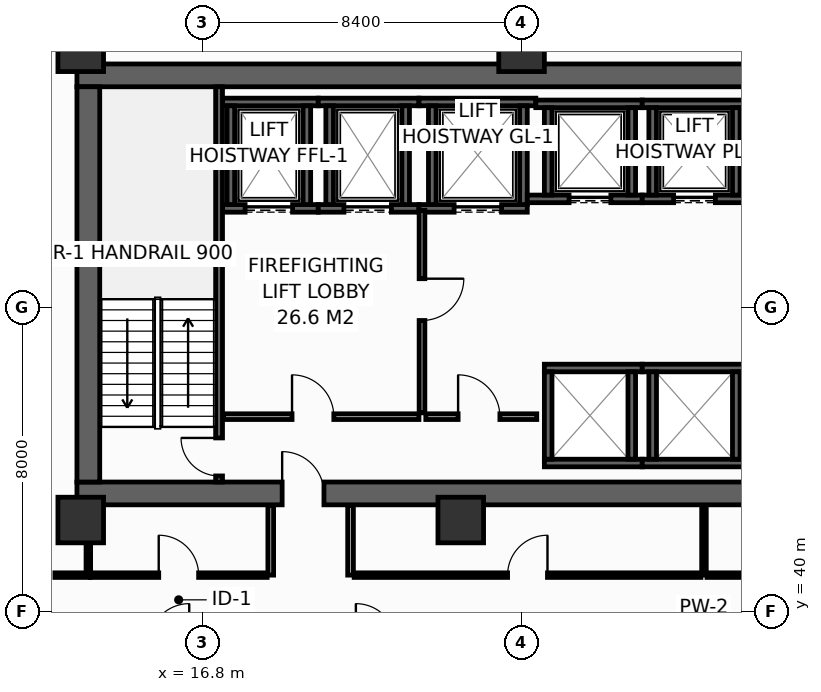
"""IFC4 building model, lengths in metres.
Left out: names, types, materials, properties, quantities, classifications, styles, units other than length and angle.
Written with IfcOpenShell. Run it as: python <this file> out.ifc"""

import sys

from ifc_helpers import new_model, si_unit, direction, frame, frame_2d, origin, origin_2d, place, context, subcontext, project, spatial, rectangle, hollow_rectangle, extrude, element, fill, save


model = new_model("IFC4")
c1 = context("Model", 3, precision=1e-05, world=origin(), true_north=direction((0.0, 1.0)))
c2 = subcontext(c1, "Body", "Model", "MODEL_VIEW")
j1 = project(units=[si_unit("LENGTHUNIT", "METRE"), si_unit("PLANEANGLEUNIT", "RADIAN")], contexts=[c1])
p1 = place(None, origin())
s1 = spatial("IfcSite", under=j1, at=p1, CompositionType="ELEMENT")
p2 = place(p1, origin())
s2 = spatial("IfcBuilding", under=s1, at=p2, CompositionType="ELEMENT")
p3 = place(p2, frame((0.0, 0.0, 47.2)))
s3 = spatial("IfcBuildingStorey", under=s2, at=p3, CompositionType="ELEMENT", Elevation=47.2)
p4 = place(p3, frame((13.5, 43.1, 0.0), z_axis=(0.0, 0.0, 1.0), x_axis=(1.0, 0.0, 0.0)))
e1 = element("IfcWall", 1, at=p4, inside=s3, PredefinedType="SHEAR", context=c2, shape_type="SweptSolid", body=[
    extrude(rectangle(XDim=32.9, YDim=0.6, at=frame_2d((16.45, 0.0))), origin(), (0.0, 0.0, 1.0), 4.15),
])
p5 = place(p4, frame((5.4, 0.0, 0.0)))
e2 = element("IfcOpeningElement", 2, at=p5, cuts=e1, PredefinedType="OPENING", context=c2, shape_type="SweptSolid", body=[
    extrude(rectangle(XDim=1.1, YDim=2.15, at=frame_2d((0.55, 1.075))), frame((0.0, 0.31, 0.0), z_axis=(0.0, -1.0, 0.0), x_axis=(1.0, 0.0, 0.0)), (0.0, 0.0, 1.0), 0.62),
])
p6 = place(p4, frame((25.6, 0.0, 0.0)))
e3 = element("IfcOpeningElement", 3, at=p6, cuts=e1, PredefinedType="OPENING", context=c2, shape_type="SweptSolid", body=[
    extrude(rectangle(XDim=1.1, YDim=2.15, at=frame_2d((0.55, 1.075))), frame((0.0, 0.31, 0.0), z_axis=(0.0, -1.0, 0.0), x_axis=(1.0, 0.0, 0.0)), (0.0, 0.0, 1.0), 0.62),
])
p7 = place(p3, frame((13.5, 54.1, 0.0), z_axis=(0.0, 0.0, 1.0), x_axis=(1.0, 0.0, 0.0)))
e4 = element("IfcWall", 4, at=p7, inside=s3, PredefinedType="SHEAR", context=c2, shape_type="SweptSolid", body=[
    extrude(rectangle(XDim=32.9, YDim=0.6, at=frame_2d((16.45, 0.0))), origin(), (0.0, 0.0, 1.0), 4.15),
])
p8 = place(p3, frame((13.8, 43.4, 0.0), z_axis=(0.0, 0.0, 1.0), x_axis=(0.0, 1.0, 0.0)))
e5 = element("IfcWall", 5, at=p8, inside=s3, PredefinedType="SHEAR", context=c2, shape_type="SweptSolid", body=[
    extrude(rectangle(XDim=10.4, YDim=0.6, at=frame_2d((5.2, 0.0))), origin(), (0.0, 0.0, 1.0), 4.15),
])
for number, where, z_axis, x_axis in (
    (6, (13.6, 54.8, 0.0), (0.0, 0.0, 1.0), (1.0, 0.0, 0.0)),
    (7, (25.2, 54.8, 0.0), (0.0, 0.0, 1.0), (1.0, 0.0, 0.0)),
    (8, (13.6, 42.4, 0.0), (0.0, 0.0, 1.0), (1.0, 0.0, 0.0)),
    (9, (23.6, 42.4, 0.0), (0.0, 0.0, 1.0), (1.0, 0.0, 0.0)),
):
    element("IfcColumn", number, at=place(p3, frame(where, z_axis=z_axis, x_axis=x_axis)), inside=s3, PredefinedType="COLUMN", context=c2, shape_type="SweptSolid", body=[
        extrude(hollow_rectangle(XDim=1.2, YDim=1.2, WallThickness=0.055, at=origin_2d()), origin(), (0.0, 0.0, 1.0), 4.4),
    ])
p9 = place(p3, frame((17.33, 50.6, 0.0), z_axis=(0.0, 0.0, 1.0), x_axis=(1.0, 0.0, 0.0)))
e10 = element("IfcWall", 10, at=p9, inside=s3, PredefinedType="SHEAR", context=c2, shape_type="SweptSolid", body=[
    extrude(rectangle(XDim=2.52, YDim=0.2, at=frame_2d((1.26, 0.0))), origin(), (0.0, 0.0, 1.0), 4.15),
])
p10 = place(p9, frame((0.595, 0.0, 0.0)))
e11 = element("IfcOpeningElement", 11, at=p10, cuts=e10, PredefinedType="OPENING", context=c2, shape_type="SweptSolid", body=[
    extrude(rectangle(XDim=1.25, YDim=2.3, at=frame_2d((0.625, 1.15))), frame((0.0, 0.11, 0.0), z_axis=(0.0, -1.0, 0.0), x_axis=(1.0, 0.0, 0.0)), (0.0, 0.0, 1.0), 0.22),
])
p11 = place(p3, frame((17.33, 53.4, 0.0), z_axis=(0.0, 0.0, 1.0), x_axis=(1.0, 0.0, 0.0)))
e12 = element("IfcWall", 12, at=p11, inside=s3, PredefinedType="SHEAR", context=c2, shape_type="SweptSolid", body=[
    extrude(rectangle(XDim=2.52, YDim=0.2, at=frame_2d((1.26, 0.0))), origin(), (0.0, 0.0, 1.0), 4.15),
])
for number, where, z_axis, x_axis in (
    (13, (17.55, 50.7, 0.0), (0.0, 0.0, 1.0), (0.0, 1.0, 0.0)),
    (14, (19.55, 50.7, 0.0), (0.0, 0.0, 1.0), (0.0, 1.0, 0.0)),
):
    element("IfcWall", number, at=place(p3, frame(where, z_axis=z_axis, x_axis=x_axis)), inside=s3, PredefinedType="SHEAR", context=c2, shape_type="SweptSolid", body=[
        extrude(rectangle(XDim=2.6, YDim=0.2, at=frame_2d((1.3, 0.0))), origin(), (0.0, 0.0, 1.0), 4.15),
    ])
p12 = place(p3, frame((19.85, 50.6, 0.0), z_axis=(0.0, 0.0, 1.0), x_axis=(1.0, 0.0, 0.0)))
e15 = element("IfcWall", 15, at=p12, inside=s3, PredefinedType="SHEAR", context=c2, shape_type="SweptSolid", body=[
    extrude(rectangle(XDim=2.65, YDim=0.2, at=frame_2d((1.325, 0.0))), origin(), (0.0, 0.0, 1.0), 4.15),
])
p13 = place(p12, frame((0.675, 0.0, 0.0)))
e16 = element("IfcOpeningElement", 16, at=p13, cuts=e15, PredefinedType="OPENING", context=c2, shape_type="SweptSolid", body=[
    extrude(rectangle(XDim=1.25, YDim=2.3, at=frame_2d((0.625, 1.15))), frame((0.0, 0.11, 0.0), z_axis=(0.0, -1.0, 0.0), x_axis=(1.0, 0.0, 0.0)), (0.0, 0.0, 1.0), 0.22),
])
p14 = place(p3, frame((19.85, 53.4, 0.0), z_axis=(0.0, 0.0, 1.0), x_axis=(1.0, 0.0, 0.0)))
e17 = element("IfcWall", 17, at=p14, inside=s3, PredefinedType="SHEAR", context=c2, shape_type="SweptSolid", body=[
    extrude(rectangle(XDim=2.65, YDim=0.2, at=frame_2d((1.325, 0.0))), origin(), (0.0, 0.0, 1.0), 4.15),
])
for number, where, z_axis, x_axis in (
    (18, (20.15, 50.7, 0.0), (0.0, 0.0, 1.0), (0.0, 1.0, 0.0)),
    (19, (22.15, 50.7, 0.0), (0.0, 0.0, 1.0), (0.0, 1.0, 0.0)),
):
    element("IfcWall", number, at=place(p3, frame(where, z_axis=z_axis, x_axis=x_axis)), inside=s3, PredefinedType="SHEAR", context=c2, shape_type="SweptSolid", body=[
        extrude(rectangle(XDim=2.6, YDim=0.2, at=frame_2d((1.3, 0.0))), origin(), (0.0, 0.0, 1.0), 4.15),
    ])
p15 = place(p3, frame((22.5, 50.6, 0.0), z_axis=(0.0, 0.0, 1.0), x_axis=(1.0, 0.0, 0.0)))
e20 = element("IfcWall", 20, at=p15, inside=s3, PredefinedType="SHEAR", context=c2, shape_type="SweptSolid", body=[
    extrude(rectangle(XDim=2.85, YDim=0.2, at=frame_2d((1.425, 0.0))), origin(), (0.0, 0.0, 1.0), 4.15),
])
p16 = place(p15, frame((0.925, 0.0, 0.0)))
e21 = element("IfcOpeningElement", 21, at=p16, cuts=e20, PredefinedType="OPENING", context=c2, shape_type="SweptSolid", body=[
    extrude(rectangle(XDim=1.25, YDim=2.3, at=frame_2d((0.625, 1.15))), frame((0.0, 0.11, 0.0), z_axis=(0.0, -1.0, 0.0), x_axis=(1.0, 0.0, 0.0)), (0.0, 0.0, 1.0), 0.22),
])
p17 = place(p3, frame((22.5, 53.4, 0.0), z_axis=(0.0, 0.0, 1.0), x_axis=(1.0, 0.0, 0.0)))
e22 = element("IfcWall", 22, at=p17, inside=s3, PredefinedType="SHEAR", context=c2, shape_type="SweptSolid", body=[
    extrude(rectangle(XDim=3.075, YDim=0.2, at=frame_2d((1.538, 0.0))), origin(), (0.0, 0.0, 1.0), 4.15),
])
for number, where, z_axis, x_axis in (
    (23, (22.85, 50.7, 0.0), (0.0, 0.0, 1.0), (0.0, 1.0, 0.0)),
    (24, (25.25, 50.7, 0.0), (0.0, 0.0, 1.0), (0.0, 1.0, 0.0)),
):
    element("IfcWall", number, at=place(p3, frame(where, z_axis=z_axis, x_axis=x_axis)), inside=s3, PredefinedType="SHEAR", context=c2, shape_type="SweptSolid", body=[
        extrude(rectangle(XDim=2.6, YDim=0.2, at=frame_2d((1.3, 0.0))), origin(), (0.0, 0.0, 1.0), 4.15),
    ])
p18 = place(p3, frame((25.35, 50.85, 0.0), z_axis=(0.0, 0.0, 1.0), x_axis=(1.0, 0.0, 0.0)))
e25 = element("IfcWall", 25, at=p18, inside=s3, PredefinedType="SHEAR", context=c2, shape_type="SweptSolid", body=[
    extrude(rectangle(XDim=3.025, YDim=0.2, at=frame_2d((1.512, 0.0))), origin(), (0.0, 0.0, 1.0), 4.15),
])
p19 = place(p18, frame((1.1, 0.0, 0.0)))
e26 = element("IfcOpeningElement", 26, at=p19, cuts=e25, PredefinedType="OPENING", context=c2, shape_type="SweptSolid", body=[
    extrude(rectangle(XDim=1.1, YDim=2.2, at=frame_2d((0.55, 1.1))), frame((0.0, 0.11, 0.0), z_axis=(0.0, -1.0, 0.0), x_axis=(1.0, 0.0, 0.0)), (0.0, 0.0, 1.0), 0.22),
])
p20 = place(p3, frame((25.575, 53.35, 0.0), z_axis=(0.0, 0.0, 1.0), x_axis=(1.0, 0.0, 0.0)))
e27 = element("IfcWall", 27, at=p20, inside=s3, PredefinedType="SHEAR", context=c2, shape_type="SweptSolid", body=[
    extrude(rectangle(XDim=2.8, YDim=0.2, at=frame_2d((1.4, 0.0))), origin(), (0.0, 0.0, 1.0), 4.15),
])
for number, where, z_axis, x_axis in (
    (28, (25.9, 50.95, 0.0), (0.0, 0.0, 1.0), (0.0, 1.0, 0.0)),
    (29, (28.1, 50.95, 0.0), (0.0, 0.0, 1.0), (0.0, 1.0, 0.0)),
):
    element("IfcWall", number, at=place(p3, frame(where, z_axis=z_axis, x_axis=x_axis)), inside=s3, PredefinedType="SHEAR", context=c2, shape_type="SweptSolid", body=[
        extrude(rectangle(XDim=2.3, YDim=0.2, at=frame_2d((1.15, 0.0))), origin(), (0.0, 0.0, 1.0), 4.15),
    ])
p21 = place(p3, frame((28.375, 50.85, 0.0), z_axis=(0.0, 0.0, 1.0), x_axis=(1.0, 0.0, 0.0)))
e30 = element("IfcWall", 30, at=p21, inside=s3, PredefinedType="SHEAR", context=c2, shape_type="SweptSolid", body=[
    extrude(rectangle(XDim=2.75, YDim=0.2, at=frame_2d((1.375, 0.0))), origin(), (0.0, 0.0, 1.0), 4.15),
])
p22 = place(p21, frame((0.825, 0.0, 0.0)))
e31 = element("IfcOpeningElement", 31, at=p22, cuts=e30, PredefinedType="OPENING", context=c2, shape_type="SweptSolid", body=[
    extrude(rectangle(XDim=1.1, YDim=2.2, at=frame_2d((0.55, 1.1))), frame((0.0, 0.11, 0.0), z_axis=(0.0, -1.0, 0.0), x_axis=(1.0, 0.0, 0.0)), (0.0, 0.0, 1.0), 0.22),
])
p23 = place(p3, frame((28.375, 53.35, 0.0), z_axis=(0.0, 0.0, 1.0), x_axis=(1.0, 0.0, 0.0)))
e32 = element("IfcWall", 32, at=p23, inside=s3, PredefinedType="SHEAR", context=c2, shape_type="SweptSolid", body=[
    extrude(rectangle(XDim=2.75, YDim=0.2, at=frame_2d((1.375, 0.0))), origin(), (0.0, 0.0, 1.0), 4.15),
])
for number, where, z_axis, x_axis in (
    (33, (28.65, 50.95, 0.0), (0.0, 0.0, 1.0), (0.0, 1.0, 0.0)),
    (34, (30.85, 50.95, 0.0), (0.0, 0.0, 1.0), (0.0, 1.0, 0.0)),
):
    element("IfcWall", number, at=place(p3, frame(where, z_axis=z_axis, x_axis=x_axis)), inside=s3, PredefinedType="SHEAR", context=c2, shape_type="SweptSolid", body=[
        extrude(rectangle(XDim=2.3, YDim=0.2, at=frame_2d((1.15, 0.0))), origin(), (0.0, 0.0, 1.0), 4.15),
    ])
for number, where, z_axis, x_axis in (
    (35, (25.8, 43.9, 0.0), (0.0, 0.0, 1.0), (1.0, 0.0, 0.0)),
    (36, (25.8, 46.4, 0.0), (0.0, 0.0, 1.0), (1.0, 0.0, 0.0)),
):
    element("IfcWall", number, at=place(p3, frame(where, z_axis=z_axis, x_axis=x_axis)), inside=s3, PredefinedType="SHEAR", context=c2, shape_type="SweptSolid", body=[
        extrude(rectangle(XDim=2.575, YDim=0.2, at=frame_2d((1.288, 0.0))), origin(), (0.0, 0.0, 1.0), 4.15),
    ])
for number, where, z_axis, x_axis in (
    (37, (25.9, 44.0, 0.0), (0.0, 0.0, 1.0), (0.0, 1.0, 0.0)),
    (38, (28.1, 44.0, 0.0), (0.0, 0.0, 1.0), (0.0, 1.0, 0.0)),
):
    element("IfcWall", number, at=place(p3, frame(where, z_axis=z_axis, x_axis=x_axis)), inside=s3, PredefinedType="SHEAR", context=c2, shape_type="SweptSolid", body=[
        extrude(rectangle(XDim=2.3, YDim=0.2, at=frame_2d((1.15, 0.0))), origin(), (0.0, 0.0, 1.0), 4.15),
    ])
for number, where, z_axis, x_axis in (
    (39, (28.375, 43.9, 0.0), (0.0, 0.0, 1.0), (1.0, 0.0, 0.0)),
    (40, (28.375, 46.4, 0.0), (0.0, 0.0, 1.0), (1.0, 0.0, 0.0)),
):
    element("IfcWall", number, at=place(p3, frame(where, z_axis=z_axis, x_axis=x_axis)), inside=s3, PredefinedType="SHEAR", context=c2, shape_type="SweptSolid", body=[
        extrude(rectangle(XDim=2.75, YDim=0.2, at=frame_2d((1.375, 0.0))), origin(), (0.0, 0.0, 1.0), 4.15),
    ])
for number, where, z_axis, x_axis in (
    (41, (28.65, 44.0, 0.0), (0.0, 0.0, 1.0), (0.0, 1.0, 0.0)),
    (42, (30.85, 44.0, 0.0), (0.0, 0.0, 1.0), (0.0, 1.0, 0.0)),
):
    element("IfcWall", number, at=place(p3, frame(where, z_axis=z_axis, x_axis=x_axis)), inside=s3, PredefinedType="SHEAR", context=c2, shape_type="SweptSolid", body=[
        extrude(rectangle(XDim=2.3, YDim=0.2, at=frame_2d((1.15, 0.0))), origin(), (0.0, 0.0, 1.0), 4.15),
    ])
p24 = place(p3, frame((17.24, 43.4, 0.0), z_axis=(0.0, 0.0, 1.0), x_axis=(0.0, 1.0, 0.0)))
e43 = element("IfcWall", 43, at=p24, inside=s3, PredefinedType="SHEAR", context=c2, shape_type="SweptSolid", body=[
    extrude(rectangle(XDim=10.4, YDim=0.18, at=frame_2d((5.2, 0.0))), origin(), (0.0, 0.0, 1.0), 4.15),
])
p25 = place(p24, frame((0.16, 0.0, 0.0)))
e44 = element("IfcOpeningElement", 44, at=p25, cuts=e43, PredefinedType="OPENING", context=c2, shape_type="SweptSolid", body=[
    extrude(rectangle(XDim=1.0, YDim=2.15, at=frame_2d((0.5, 1.075))), frame((0.0, 0.1, 0.0), z_axis=(0.0, -1.0, 0.0), x_axis=(1.0, 0.0, 0.0)), (0.0, 0.0, 1.0), 0.2),
])
p26 = place(p3, frame((17.36, 45.12, 0.0), z_axis=(0.0, 0.0, 1.0), x_axis=(1.0, 0.0, 0.0)))
e45 = element("IfcWall", 45, at=p26, inside=s3, PredefinedType="PARTITIONING", context=c2, shape_type="SweptSolid", body=[
    extrude(rectangle(XDim=5.14, YDim=0.15, at=frame_2d((2.57, 0.0))), origin(), (0.0, 0.0, 1.0), 4.15),
])
p27 = place(p26, frame((1.8, 0.0, 0.0)))
e46 = element("IfcOpeningElement", 46, at=p27, cuts=e45, PredefinedType="OPENING", context=c2, shape_type="SweptSolid", body=[
    extrude(rectangle(XDim=1.1, YDim=2.15, at=frame_2d((0.55, 1.075))), frame((0.0, 0.085, 0.0), z_axis=(0.0, -1.0, 0.0), x_axis=(1.0, 0.0, 0.0)), (0.0, 0.0, 1.0), 0.17),
])
p28 = place(p3, frame((22.58, 50.55, 0.0), z_axis=(0.0, 0.0, 1.0), x_axis=(0.0, -1.0, 0.0)))
e47 = element("IfcWall", 47, at=p28, inside=s3, PredefinedType="PARTITIONING", context=c2, shape_type="SweptSolid", body=[
    extrude(rectangle(XDim=5.33, YDim=0.15, at=frame_2d((2.665, 0.0))), origin(), (0.0, 0.0, 1.0), 4.15),
])
p29 = place(p28, frame((1.8, 0.0, 0.0)))
e48 = element("IfcOpeningElement", 48, at=p29, cuts=e47, PredefinedType="OPENING", context=c2, shape_type="SweptSolid", body=[
    extrude(rectangle(XDim=1.1, YDim=2.15, at=frame_2d((0.55, 1.075))), frame((0.0, 0.085, 0.0), z_axis=(0.0, -1.0, 0.0), x_axis=(1.0, 0.0, 0.0)), (0.0, 0.0, 1.0), 0.17),
])
p30 = place(p3, frame((22.68, 45.12, 0.0), z_axis=(0.0, 0.0, 1.0), x_axis=(1.0, 0.0, 0.0)))
e49 = element("IfcWall", 49, at=p30, inside=s3, PredefinedType="PARTITIONING", context=c2, shape_type="SweptSolid", body=[
    extrude(rectangle(XDim=2.92, YDim=0.15, at=frame_2d((1.46, 0.0))), origin(), (0.0, 0.0, 1.0), 4.15),
])
p31 = place(p30, frame((0.85, 0.0, 0.0)))
e50 = element("IfcOpeningElement", 50, at=p31, cuts=e49, PredefinedType="OPENING", context=c2, shape_type="SweptSolid", body=[
    extrude(rectangle(XDim=1.1, YDim=2.15, at=frame_2d((0.55, 1.075))), frame((0.0, 0.085, 0.0), z_axis=(0.0, -1.0, 0.0), x_axis=(1.0, 0.0, 0.0)), (0.0, 0.0, 1.0), 0.17),
])
p32 = place(p3, frame((12.92, 40.95, 0.0), z_axis=(0.0, 0.0, 1.0), x_axis=(1.0, 0.0, 0.0)))
e51 = element("IfcWall", 51, at=p32, inside=s3, PredefinedType="PARTITIONING", context=c2, shape_type="SweptSolid", body=[
    extrude(rectangle(XDim=0.93, YDim=0.12, at=frame_2d((0.465, 0.0))), origin(), (0.0, 0.0, 1.0), 4.15),
])
p33 = place(p3, frame((13.8, 41.03, 0.0), z_axis=(0.0, 0.0, 1.0), x_axis=(0.0, 1.0, 0.0)))
e52 = element("IfcWall", 52, at=p33, inside=s3, PredefinedType="PARTITIONING", context=c2, shape_type="SweptSolid", body=[
    extrude(rectangle(XDim=1.75, YDim=0.12, at=frame_2d((0.875, 0.0))), origin(), (0.0, 0.0, 1.0), 4.15),
])
for number, where, z_axis, x_axis in (
    (53, (18.6, 40.95, 0.0), (0.0, 0.0, 1.0), (0.0, 1.0, 0.0)),
    (54, (20.7, 40.95, 0.0), (0.0, 0.0, 1.0), (0.0, 1.0, 0.0)),
):
    element("IfcWall", number, at=place(p3, frame(where, z_axis=z_axis, x_axis=x_axis)), inside=s3, PredefinedType="PARTITIONING", context=c2, shape_type="SweptSolid", body=[
        extrude(rectangle(XDim=1.83, YDim=0.15, at=frame_2d((0.915, 0.0))), origin(), (0.0, 0.0, 1.0), 4.15),
    ])
p34 = place(p3, frame((13.85, 40.95, 0.0), z_axis=(0.0, 0.0, 1.0), x_axis=(1.0, 0.0, 0.0)))
e55 = element("IfcWall", 55, at=p34, inside=s3, PredefinedType="PARTITIONING", context=c2, shape_type="SweptSolid", body=[
    extrude(rectangle(XDim=4.655, YDim=0.12, at=frame_2d((2.327, 0.0))), origin(), (0.0, 0.0, 1.0), 4.15),
])
p35 = place(p34, frame((1.802, 0.0, 0.0)))
e56 = element("IfcOpeningElement", 56, at=p35, cuts=e55, PredefinedType="OPENING", context=c2, shape_type="SweptSolid", body=[
    extrude(rectangle(XDim=1.05, YDim=2.15, at=frame_2d((0.525, 1.075))), frame((0.0, 0.07, 0.0), z_axis=(0.0, -1.0, 0.0), x_axis=(1.0, 0.0, 0.0)), (0.0, 0.0, 1.0), 0.14),
])
p36 = place(p3, frame((30.0, 40.95, 0.0), z_axis=(0.0, 0.0, 1.0), x_axis=(0.0, 1.0, 0.0)))
e57 = element("IfcWall", 57, at=p36, inside=s3, PredefinedType="PARTITIONING", context=c2, shape_type="SweptSolid", body=[
    extrude(rectangle(XDim=1.83, YDim=0.12, at=frame_2d((0.915, 0.0))), origin(), (0.0, 0.0, 1.0), 3.335),
])
p37 = place(p3, frame((20.795, 40.95, 0.0), z_axis=(0.0, 0.0, 1.0), x_axis=(1.0, 0.0, 0.0)))
e58 = element("IfcWall", 58, at=p37, inside=s3, PredefinedType="PARTITIONING", context=c2, shape_type="SweptSolid", body=[
    extrude(rectangle(XDim=9.125, YDim=0.12, at=frame_2d((4.562, 0.0))), origin(), (0.0, 0.0, 1.0), 3.335),
])
p38 = place(p37, frame((4.037, 0.0, 0.0)))
e59 = element("IfcOpeningElement", 59, at=p38, cuts=e58, PredefinedType="OPENING", context=c2, shape_type="SweptSolid", body=[
    extrude(rectangle(XDim=1.05, YDim=2.15, at=frame_2d((0.525, 1.075))), frame((0.0, 0.07, 0.0), z_axis=(0.0, -1.0, 0.0), x_axis=(1.0, 0.0, 0.0)), (0.0, 0.0, 1.0), 0.14),
])
p39 = place(p3, frame((30.08, 40.95, 0.0), z_axis=(0.0, 0.0, 1.0), x_axis=(1.0, 0.0, 0.0)))
e60 = element("IfcWall", 60, at=p39, inside=s3, PredefinedType="PARTITIONING", context=c2, shape_type="SweptSolid", body=[
    extrude(rectangle(XDim=8.625, YDim=0.12, at=frame_2d((4.312, 0.0))), origin(), (0.0, 0.0, 1.0), 3.335),
])
p40 = place(p39, frame((3.862, 0.0, 0.0)))
e61 = element("IfcOpeningElement", 61, at=p40, cuts=e60, PredefinedType="OPENING", context=c2, shape_type="SweptSolid", body=[
    extrude(rectangle(XDim=0.9, YDim=2.1, at=frame_2d((0.45, 1.05))), frame((0.0, 0.07, 0.0), z_axis=(0.0, -1.0, 0.0), x_axis=(1.0, 0.0, 0.0)), (0.0, 0.0, 1.0), 0.14),
])
p41 = place(p10, origin())
e62 = element("IfcDoor", 62, at=p41, inside=s3, OperationType="SLIDING_TO_LEFT", PredefinedType="DOOR", context=c2, shape_type="SweptSolid", body=[
    extrude(rectangle(XDim=1.25, YDim=2.3, at=frame_2d((0.625, 1.15))), frame((0.0, 0.025, 0.0), z_axis=(0.0, -1.0, 0.0), x_axis=(1.0, 0.0, 0.0)), (0.0, 0.0, 1.0), 0.05),
])
fill(e11, e62)
p42 = place(p13, origin())
e63 = element("IfcDoor", 63, at=p42, inside=s3, OperationType="SLIDING_TO_LEFT", PredefinedType="DOOR", context=c2, shape_type="SweptSolid", body=[
    extrude(rectangle(XDim=1.25, YDim=2.3, at=frame_2d((0.625, 1.15))), frame((0.0, 0.025, 0.0), z_axis=(0.0, -1.0, 0.0), x_axis=(1.0, 0.0, 0.0)), (0.0, 0.0, 1.0), 0.05),
])
fill(e16, e63)
p43 = place(p16, origin())
e64 = element("IfcDoor", 64, at=p43, inside=s3, OperationType="SLIDING_TO_LEFT", PredefinedType="DOOR", context=c2, shape_type="SweptSolid", body=[
    extrude(rectangle(XDim=1.25, YDim=2.3, at=frame_2d((0.625, 1.15))), frame((0.0, 0.025, 0.0), z_axis=(0.0, -1.0, 0.0), x_axis=(1.0, 0.0, 0.0)), (0.0, 0.0, 1.0), 0.05),
])
fill(e21, e64)
p44 = place(p19, origin())
e65 = element("IfcDoor", 65, at=p44, inside=s3, OperationType="SLIDING_TO_LEFT", PredefinedType="DOOR", context=c2, shape_type="SweptSolid", body=[
    extrude(rectangle(XDim=1.1, YDim=2.2, at=frame_2d((0.55, 1.1))), frame((0.0, 0.025, 0.0), z_axis=(0.0, -1.0, 0.0), x_axis=(1.0, 0.0, 0.0)), (0.0, 0.0, 1.0), 0.05),
])
fill(e26, e65)
p45 = place(p22, origin())
e66 = element("IfcDoor", 66, at=p45, inside=s3, OperationType="SLIDING_TO_LEFT", PredefinedType="DOOR", context=c2, shape_type="SweptSolid", body=[
    extrude(rectangle(XDim=1.1, YDim=2.2, at=frame_2d((0.55, 1.1))), frame((0.0, 0.025, 0.0), z_axis=(0.0, -1.0, 0.0), x_axis=(1.0, 0.0, 0.0)), (0.0, 0.0, 1.0), 0.05),
])
fill(e31, e66)
p46 = place(p25, origin())
e67 = element("IfcDoor", 67, at=p46, inside=s3, OperationType="SINGLE_SWING_RIGHT", PredefinedType="DOOR", context=c2, shape_type="SweptSolid", body=[
    extrude(rectangle(XDim=1.0, YDim=2.15, at=frame_2d((0.5, 1.075))), frame((0.0, 0.025, 0.0), z_axis=(0.0, -1.0, 0.0), x_axis=(1.0, 0.0, 0.0)), (0.0, 0.0, 1.0), 0.05),
])
fill(e44, e67)
p47 = place(p27, origin())
e68 = element("IfcDoor", 68, at=p47, inside=s3, OperationType="SINGLE_SWING_LEFT", PredefinedType="DOOR", context=c2, shape_type="SweptSolid", body=[
    extrude(rectangle(XDim=1.1, YDim=2.15, at=frame_2d((0.55, 1.075))), frame((0.0, 0.025, 0.0), z_axis=(0.0, -1.0, 0.0), x_axis=(1.0, 0.0, 0.0)), (0.0, 0.0, 1.0), 0.05),
])
fill(e46, e68)
p48 = place(p29, origin())
e69 = element("IfcDoor", 69, at=p48, inside=s3, OperationType="SINGLE_SWING_LEFT", PredefinedType="DOOR", context=c2, shape_type="SweptSolid", body=[
    extrude(rectangle(XDim=1.1, YDim=2.15, at=frame_2d((0.55, 1.075))), frame((0.0, 0.025, 0.0), z_axis=(0.0, -1.0, 0.0), x_axis=(1.0, 0.0, 0.0)), (0.0, 0.0, 1.0), 0.05),
])
fill(e48, e69)
p49 = place(p31, origin())
e70 = element("IfcDoor", 70, at=p49, inside=s3, OperationType="SINGLE_SWING_LEFT", PredefinedType="DOOR", context=c2, shape_type="SweptSolid", body=[
    extrude(rectangle(XDim=1.1, YDim=2.15, at=frame_2d((0.55, 1.075))), frame((0.0, 0.025, 0.0), z_axis=(0.0, -1.0, 0.0), x_axis=(1.0, 0.0, 0.0)), (0.0, 0.0, 1.0), 0.05),
])
fill(e50, e70)
p50 = place(p5, origin())
e71 = element("IfcDoor", 71, at=p50, inside=s3, OperationType="SINGLE_SWING_LEFT", PredefinedType="DOOR", context=c2, shape_type="SweptSolid", body=[
    extrude(rectangle(XDim=1.1, YDim=2.15, at=frame_2d((0.55, 1.075))), frame((0.0, 0.025, 0.0), z_axis=(0.0, -1.0, 0.0), x_axis=(1.0, 0.0, 0.0)), (0.0, 0.0, 1.0), 0.05),
])
fill(e2, e71)
p51 = place(p35, origin())
e72 = element("IfcDoor", 72, at=p51, inside=s3, OperationType="SINGLE_SWING_LEFT", PredefinedType="DOOR", context=c2, shape_type="SweptSolid", body=[
    extrude(rectangle(XDim=1.05, YDim=2.15, at=frame_2d((0.525, 1.075))), frame((0.0, 0.025, 0.0), z_axis=(0.0, -1.0, 0.0), x_axis=(1.0, 0.0, 0.0)), (0.0, 0.0, 1.0), 0.05),
])
fill(e56, e72)
p52 = place(p38, origin())
e73 = element("IfcDoor", 73, at=p52, inside=s3, OperationType="SINGLE_SWING_RIGHT", PredefinedType="DOOR", context=c2, shape_type="SweptSolid", body=[
    extrude(rectangle(XDim=1.05, YDim=2.15, at=frame_2d((0.525, 1.075))), frame((0.0, 0.025, 0.0), z_axis=(0.0, -1.0, 0.0), x_axis=(1.0, 0.0, 0.0)), (0.0, 0.0, 1.0), 0.05),
])
fill(e59, e73)
save(model, sys.argv[1])
